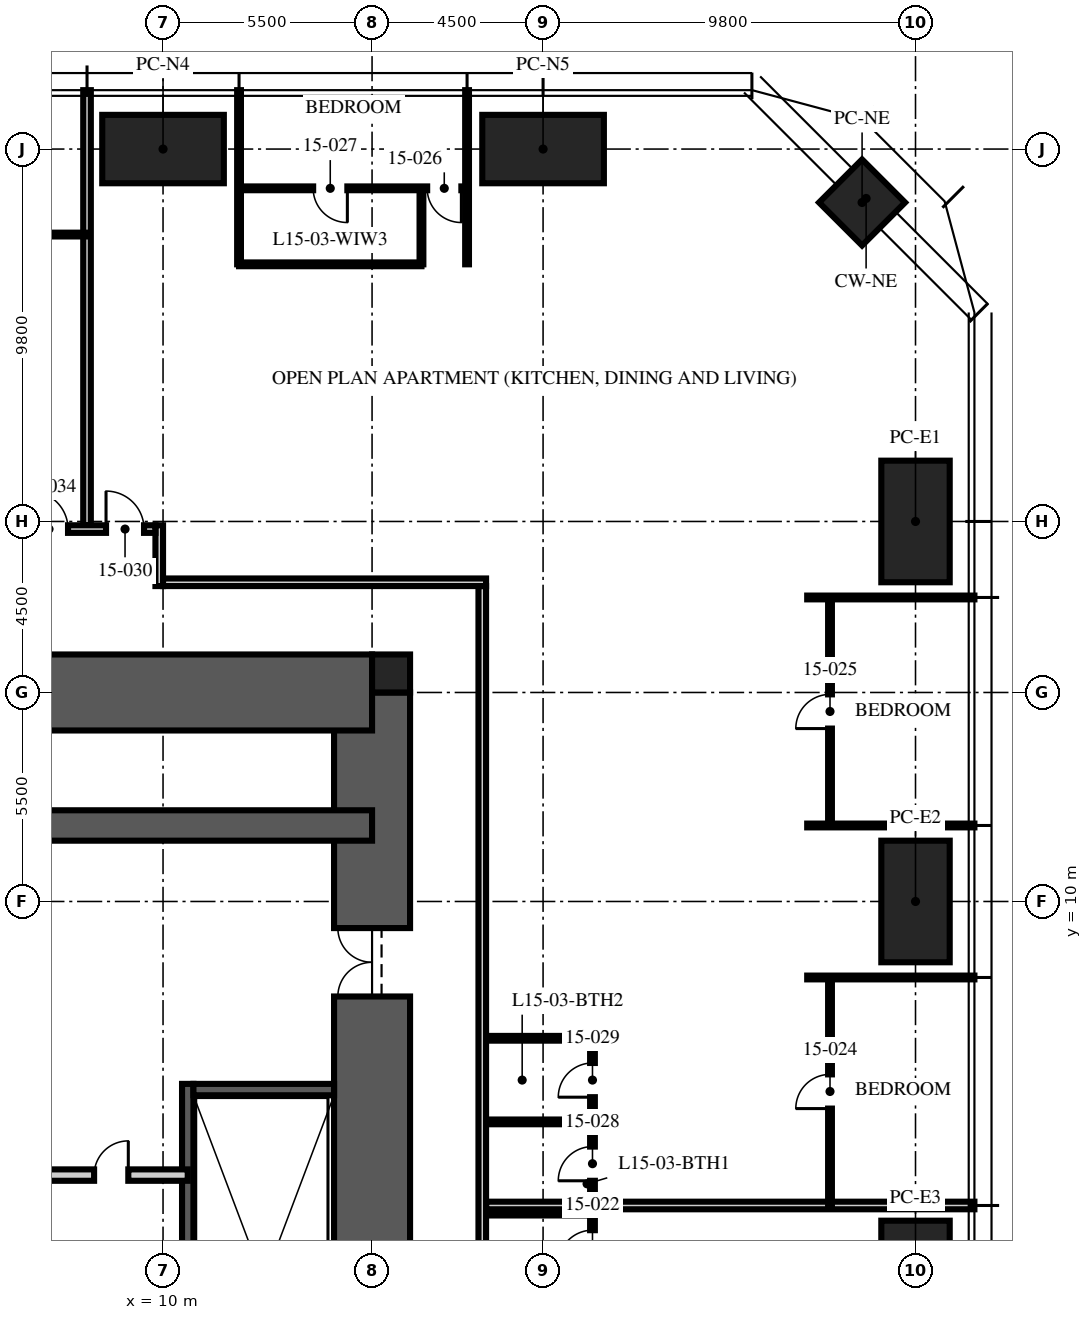
"""IFC4 building model, lengths in metres.
Left out: names, types, materials, properties, quantities, classifications, styles, units other than length and angle.
Written with IfcOpenShell. Run it as: python <this file> out.ifc"""

import sys

from ifc_helpers import new_model, si_unit, direction, frame, frame_2d, origin, origin_2d, place, context, subcontext, project, spatial, rectangle, hollow_rectangle, extrude, element, fill, save


model = new_model("IFC4")
c1 = context("Model", 3, precision=1e-05, world=origin(), true_north=direction((0.0, 1.0)))
c2 = subcontext(c1, "Body", "Model", "MODEL_VIEW")
j1 = project(units=[si_unit("LENGTHUNIT", "METRE"), si_unit("PLANEANGLEUNIT", "RADIAN")], contexts=[c1])
p1 = place(None, origin())
s1 = spatial("IfcSite", under=j1, at=p1, CompositionType="ELEMENT")
p2 = place(p1, origin())
s2 = spatial("IfcBuilding", under=s1, at=p2, CompositionType="ELEMENT")
p3 = place(p2, frame((0.0, 0.0, 62.25)))
s3 = spatial("IfcBuildingStorey", under=s2, at=p3, CompositionType="ELEMENT", Elevation=62.25)
p4 = place(p3, frame((15.5, -15.5, -0.25), z_axis=(0.0, 0.0, 1.0), x_axis=(0.0, 1.0, 0.0)))
e1 = element("IfcWall", 1, at=p4, inside=s3, PredefinedType="SHEAR", context=c2, shape_type="SweptSolid", body=[
    extrude(rectangle(XDim=31.0, YDim=2.0, at=frame_2d((15.5, 0.0))), origin(), (0.0, 0.0, 1.0), 3.75),
])
p5 = place(p4, frame((6.5, 0.0, 0.25)))
e2 = element("IfcOpeningElement", 2, at=p5, cuts=e1, PredefinedType="OPENING", context=c2, shape_type="SweptSolid", body=[
    extrude(rectangle(XDim=1.2, YDim=2.1, at=frame_2d((0.6, 1.05))), frame((0.0, 1.01, 0.0), z_axis=(0.0, -1.0, 0.0), x_axis=(1.0, 0.0, 0.0)), (0.0, 0.0, 1.0), 2.02),
])
p6 = place(p4, frame((23.0, 0.0, 0.25)))
e3 = element("IfcOpeningElement", 3, at=p6, cuts=e1, PredefinedType="OPENING", context=c2, shape_type="SweptSolid", body=[
    extrude(rectangle(XDim=1.8, YDim=2.1, at=frame_2d((0.9, 1.05))), frame((0.0, 1.01, 0.0), z_axis=(0.0, -1.0, 0.0), x_axis=(1.0, 0.0, 0.0)), (0.0, 0.0, 1.0), 2.02),
])
p7 = place(p3, frame((-15.5, 15.5, -0.25), z_axis=(0.0, 0.0, 1.0), x_axis=(1.0, 0.0, 0.0)))
e4 = element("IfcWall", 4, at=p7, inside=s3, PredefinedType="SHEAR", context=c2, shape_type="SweptSolid", body=[
    extrude(rectangle(XDim=31.0, YDim=2.0, at=frame_2d((15.5, 0.0))), origin(), (0.0, 0.0, 1.0), 3.75),
])
p8 = place(p7, frame((10.4, 0.0, 0.25)))
e5 = element("IfcOpeningElement", 5, at=p8, cuts=e4, PredefinedType="OPENING", context=c2, shape_type="SweptSolid", body=[
    extrude(rectangle(XDim=1.1, YDim=2.1, at=frame_2d((0.55, 1.05))), frame((0.0, 1.01, 0.0), z_axis=(0.0, -1.0, 0.0), x_axis=(1.0, 0.0, 0.0)), (0.0, 0.0, 1.0), 2.02),
])
p9 = place(p7, frame((13.5, 0.0, 0.25)))
e6 = element("IfcOpeningElement", 6, at=p9, cuts=e4, PredefinedType="OPENING", context=c2, shape_type="SweptSolid", body=[
    extrude(rectangle(XDim=1.1, YDim=2.1, at=frame_2d((0.55, 1.05))), frame((0.0, 1.01, 0.0), z_axis=(0.0, -1.0, 0.0), x_axis=(1.0, 0.0, 0.0)), (0.0, 0.0, 1.0), 2.02),
])
p10 = place(p7, frame((16.6, 0.0, 0.25)))
e7 = element("IfcOpeningElement", 7, at=p10, cuts=e4, PredefinedType="OPENING", context=c2, shape_type="SweptSolid", body=[
    extrude(rectangle(XDim=1.1, YDim=2.1, at=frame_2d((0.55, 1.05))), frame((0.0, 1.01, 0.0), z_axis=(0.0, -1.0, 0.0), x_axis=(1.0, 0.0, 0.0)), (0.0, 0.0, 1.0), 2.02),
])
p11 = place(p3, frame((-15.5, 12.0, -0.25), z_axis=(0.0, 0.0, 1.0), x_axis=(1.0, 0.0, 0.0)))
e8 = element("IfcWall", 8, at=p11, inside=s3, PredefinedType="SHEAR", context=c2, shape_type="SweptSolid", body=[
    extrude(rectangle(XDim=31.0, YDim=0.8, at=frame_2d((15.5, 0.0))), origin(), (0.0, 0.0, 1.0), 3.75),
])
p12 = place(p3, frame((16.0, 16.0, -0.25), z_axis=(0.0, 0.0, 1.0), x_axis=(1.0, 0.0, 0.0)))
e9 = element("IfcColumn", 9, at=p12, inside=s3, PredefinedType="COLUMN", context=c2, shape_type="SweptSolid", body=[
    extrude(rectangle(XDim=1.0, YDim=1.0, at=origin_2d()), origin(), (0.0, 0.0, 1.0), 3.75),
])
for number, where, z_axis, x_axis in (
    (10, (10.0, 29.8, 0.0), (0.0, 0.0, 1.0), (1.0, 0.0, 0.0)),
    (11, (20.0, 29.8, 0.0), (0.0, 0.0, 1.0), (1.0, 0.0, 0.0)),
    (12, (29.8, 20.0, 0.0), (0.0, 0.0, 1.0), (0.0, 1.0, 0.0)),
    (13, (29.8, 10.0, 0.0), (0.0, 0.0, 1.0), (0.0, 1.0, 0.0)),
    (14, (29.8, 0.0, 0.0), (0.0, 0.0, 1.0), (0.0, 1.0, 0.0)),
):
    element("IfcColumn", number, at=place(p3, frame(where, z_axis=z_axis, x_axis=x_axis)), inside=s3, PredefinedType="COLUMN", context=c2, shape_type="SweptSolid", body=[
        extrude(hollow_rectangle(XDim=3.2, YDim=1.8, WallThickness=0.2, at=origin_2d()), origin(), (0.0, 0.0, 1.0), 3.75),
    ])
p13 = place(p3, frame((28.394, 28.394, 0.0), z_axis=(0.0, 0.0, 1.0), x_axis=(0.707106781187, -0.707106781187, 0.0)))
e15 = element("IfcColumn", 15, at=p13, inside=s3, PredefinedType="COLUMN", context=c2, shape_type="SweptSolid", body=[
    extrude(hollow_rectangle(XDim=1.6, YDim=1.6, WallThickness=0.1, at=origin_2d()), origin(), (0.0, 0.0, 1.0), 3.75),
])
p14 = place(p3, frame((10.65, -4.9, 0.0), z_axis=(0.0, 0.0, 1.0), x_axis=(0.0, 1.0, 0.0)))
e16 = element("IfcWall", 16, at=p14, inside=s3, PredefinedType="SOLIDWALL", context=c2, shape_type="SweptSolid", body=[
    extrude(rectangle(XDim=10.1, YDim=0.3, at=frame_2d((5.05, 0.0))), origin(), (0.0, 0.0, 1.0), 3.5),
])
p15 = place(p3, frame((14.5, 5.05, 0.0), z_axis=(0.0, 0.0, 1.0), x_axis=(-1.0, 0.0, 0.0)))
e17 = element("IfcWall", 17, at=p15, inside=s3, PredefinedType="SOLIDWALL", context=c2, shape_type="SweptSolid", body=[
    extrude(rectangle(XDim=3.7, YDim=0.3, at=frame_2d((1.85, 0.0))), origin(), (0.0, 0.0, 1.0), 3.5),
])
p16 = place(p3, frame((-10.65, 2.8, 0.0), z_axis=(0.0, 0.0, 1.0), x_axis=(1.0, 0.0, 0.0)))
e18 = element("IfcWall", 18, at=p16, inside=s3, PredefinedType="PARTITIONING", context=c2, shape_type="SweptSolid", body=[
    extrude(rectangle(XDim=21.3, YDim=0.3, at=frame_2d((10.65, 0.0))), origin(), (0.0, 0.0, 1.0), 3.5),
])
p17 = place(p16, frame((10.05, 0.0, 0.0)))
e19 = element("IfcOpeningElement", 19, at=p17, cuts=e18, PredefinedType="OPENING", context=c2, shape_type="SweptSolid", body=[
    extrude(rectangle(XDim=1.2, YDim=2.1, at=frame_2d((0.6, 1.05))), frame((0.0, 0.16, 0.0), z_axis=(0.0, -1.0, 0.0), x_axis=(1.0, 0.0, 0.0)), (0.0, 0.0, 1.0), 0.32),
])
p18 = place(p16, frame((1.493, 0.0, 0.0)))
e20 = element("IfcOpeningElement", 20, at=p18, cuts=e18, PredefinedType="OPENING", context=c2, shape_type="SweptSolid", body=[
    extrude(rectangle(XDim=0.9, YDim=2.1, at=frame_2d((0.45, 1.05))), frame((0.0, 0.16, 0.0), z_axis=(0.0, -1.0, 0.0), x_axis=(1.0, 0.0, 0.0)), (0.0, 0.0, 1.0), 0.32),
])
p19 = place(p16, frame((18.836, 0.0, 0.0)))
e21 = element("IfcOpeningElement", 21, at=p19, cuts=e18, PredefinedType="OPENING", context=c2, shape_type="SweptSolid", body=[
    extrude(rectangle(XDim=0.9, YDim=2.1, at=frame_2d((0.45, 1.05))), frame((0.0, 0.16, 0.0), z_axis=(0.0, -1.0, 0.0), x_axis=(1.0, 0.0, 0.0)), (0.0, 0.0, 1.0), 0.32),
])
p20 = place(p3, frame((18.5, 2.0, 0.0), z_axis=(0.0, 0.0, 1.0), x_axis=(1.0, 0.0, 0.0)))
e22 = element("IfcWall", 22, at=p20, inside=s3, PredefinedType="PARTITIONING", context=c2, shape_type="SweptSolid", body=[
    extrude(rectangle(XDim=12.85, YDim=0.2, at=frame_2d((6.425, 0.0))), origin(), (0.0, 0.0, 1.0), 2.71),
])
for number, where, z_axis, x_axis in (
    (23, (26.95, 8.0, 0.0), (0.0, 0.0, 1.0), (1.0, 0.0, 0.0)),
    (24, (26.95, 12.0, 0.0), (0.0, 0.0, 1.0), (1.0, 0.0, 0.0)),
    (25, (26.95, 18.0, 0.0), (0.0, 0.0, 1.0), (1.0, 0.0, 0.0)),
):
    element("IfcWall", number, at=place(p3, frame(where, z_axis=z_axis, x_axis=x_axis)), inside=s3, PredefinedType="PARTITIONING", context=c2, shape_type="SweptSolid", body=[
        extrude(rectangle(XDim=4.4, YDim=0.1, at=frame_2d((2.2, 0.0))), origin(), (0.0, 0.0, 1.0), 2.71),
    ])
for number, where, z_axis, x_axis in (
    (26, (18.0, 26.767, 0.0), (0.0, 0.0, 1.0), (0.0, 1.0, 0.0)),
    (27, (12.0, 26.767, 0.0), (0.0, 0.0, 1.0), (0.0, 1.0, 0.0)),
):
    element("IfcWall", number, at=place(p3, frame(where, z_axis=z_axis, x_axis=x_axis)), inside=s3, PredefinedType="PARTITIONING", context=c2, shape_type="SweptSolid", body=[
        extrude(rectangle(XDim=4.583, YDim=0.1, at=frame_2d((2.292, 0.0))), origin(), (0.0, 0.0, 1.0), 2.71),
    ])
p21 = place(p3, frame((8.0, 19.9, 0.0), z_axis=(0.0, 0.0, 1.0), x_axis=(0.0, 1.0, 0.0)))
e28 = element("IfcWall", 28, at=p21, inside=s3, PredefinedType="PARTITIONING", context=c2, shape_type="SweptSolid", body=[
    extrude(rectangle(XDim=11.45, YDim=0.2, at=frame_2d((5.725, 0.0))), origin(), (0.0, 0.0, 1.0), 2.71),
])
p22 = place(p3, frame((21.3, 0.0, 0.0), z_axis=(0.0, 0.0, 1.0), x_axis=(0.0, 1.0, 0.0)))
e29 = element("IfcWall", 29, at=p22, inside=s3, PredefinedType="PARTITIONING", context=c2, shape_type="SweptSolid", body=[
    extrude(rectangle(XDim=1.8, YDim=0.125, at=frame_2d((0.9, 0.0))), origin(), (0.0, 0.0, 1.0), 2.492),
])
p23 = place(p22, frame((0.45, 0.0, 0.0)))
e30 = element("IfcOpeningElement", 30, at=p23, cuts=e29, PredefinedType="OPENING", context=c2, shape_type="SweptSolid", body=[
    extrude(rectangle(XDim=0.9, YDim=2.1, at=frame_2d((0.45, 1.05))), frame((0.0, 0.073, 0.0), z_axis=(0.0, -1.0, 0.0), x_axis=(1.0, 0.0, 0.0)), (0.0, 0.0, 1.0), 0.145),
])
p24 = place(p3, frame((18.5, 1.8, 0.0), z_axis=(0.0, 0.0, 1.0), x_axis=(1.0, 0.0, 0.0)))
e31 = element("IfcWall", 31, at=p24, inside=s3, PredefinedType="PARTITIONING", context=c2, shape_type="SweptSolid", body=[
    extrude(rectangle(XDim=2.8, YDim=0.125, at=frame_2d((1.4, 0.0))), origin(), (0.0, 0.0, 1.0), 3.5),
])
p25 = place(p3, frame((27.55, 2.0, 0.0), z_axis=(0.0, 0.0, 1.0), x_axis=(0.0, 1.0, 0.0)))
e32 = element("IfcWall", 32, at=p25, inside=s3, PredefinedType="PARTITIONING", context=c2, shape_type="SweptSolid", body=[
    extrude(rectangle(XDim=6.0, YDim=0.1, at=frame_2d((3.0, 0.0))), origin(), (0.0, 0.0, 1.0), 2.61),
])
p26 = place(p25, frame((2.55, 0.0, 0.0)))
e33 = element("IfcOpeningElement", 33, at=p26, cuts=e32, PredefinedType="OPENING", context=c2, shape_type="SweptSolid", body=[
    extrude(rectangle(XDim=0.9, YDim=2.1, at=frame_2d((0.45, 1.05))), frame((0.0, 0.06, 0.0), z_axis=(0.0, -1.0, 0.0), x_axis=(1.0, 0.0, 0.0)), (0.0, 0.0, 1.0), 0.12),
])
p27 = place(p3, frame((27.55, 12.0, 0.0), z_axis=(0.0, 0.0, 1.0), x_axis=(0.0, 1.0, 0.0)))
e34 = element("IfcWall", 34, at=p27, inside=s3, PredefinedType="PARTITIONING", context=c2, shape_type="SweptSolid", body=[
    extrude(rectangle(XDim=6.0, YDim=0.1, at=frame_2d((3.0, 0.0))), origin(), (0.0, 0.0, 1.0), 2.61),
])
p28 = place(p27, frame((2.55, 0.0, 0.0)))
e35 = element("IfcOpeningElement", 35, at=p28, cuts=e34, PredefinedType="OPENING", context=c2, shape_type="SweptSolid", body=[
    extrude(rectangle(XDim=0.9, YDim=2.1, at=frame_2d((0.45, 1.05))), frame((0.0, 0.06, 0.0), z_axis=(0.0, -1.0, 0.0), x_axis=(1.0, 0.0, 0.0)), (0.0, 0.0, 1.0), 0.12),
])
p29 = place(p3, frame((18.0, 28.767, 0.0), z_axis=(0.0, 0.0, 1.0), x_axis=(-1.0, 0.0, 0.0)))
e36 = element("IfcWall", 36, at=p29, inside=s3, PredefinedType="PARTITIONING", context=c2, shape_type="SweptSolid", body=[
    extrude(rectangle(XDim=6.0, YDim=0.1, at=frame_2d((3.0, 0.0))), origin(), (0.0, 0.0, 1.0), 2.61),
])
p30 = place(p29, frame((0.15, 0.0, 0.0)))
e37 = element("IfcOpeningElement", 37, at=p30, cuts=e36, PredefinedType="OPENING", context=c2, shape_type="SweptSolid", body=[
    extrude(rectangle(XDim=0.9, YDim=2.1, at=frame_2d((0.45, 1.05))), frame((0.0, 0.06, 0.0), z_axis=(0.0, -1.0, 0.0), x_axis=(1.0, 0.0, 0.0)), (0.0, 0.0, 1.0), 0.12),
])
p31 = place(p29, frame((3.15, 0.0, 0.0)))
e38 = element("IfcOpeningElement", 38, at=p31, cuts=e36, PredefinedType="OPENING", context=c2, shape_type="SweptSolid", body=[
    extrude(rectangle(XDim=0.9, YDim=2.1, at=frame_2d((0.45, 1.05))), frame((0.0, 0.06, 0.0), z_axis=(0.0, -1.0, 0.0), x_axis=(1.0, 0.0, 0.0)), (0.0, 0.0, 1.0), 0.12),
])
p32 = place(p3, frame((16.8, 26.767, 0.0), z_axis=(0.0, 0.0, 1.0), x_axis=(0.0, 1.0, 0.0)))
e39 = element("IfcWall", 39, at=p32, inside=s3, PredefinedType="PARTITIONING", context=c2, shape_type="SweptSolid", body=[
    extrude(rectangle(XDim=2.0, YDim=0.1, at=frame_2d((1.0, 0.0))), origin(), (0.0, 0.0, 1.0), 3.5),
])
p33 = place(p3, frame((16.8, 26.767, 0.0), z_axis=(0.0, 0.0, 1.0), x_axis=(-1.0, 0.0, 0.0)))
e40 = element("IfcWall", 40, at=p33, inside=s3, PredefinedType="PARTITIONING", context=c2, shape_type="SweptSolid", body=[
    extrude(rectangle(XDim=4.8, YDim=0.1, at=frame_2d((2.4, 0.0))), origin(), (0.0, 0.0, 1.0), 2.61),
])
p34 = place(p3, frame((21.3, 2.0, 0.0), z_axis=(0.0, 0.0, 1.0), x_axis=(0.0, 1.0, 0.0)))
e41 = element("IfcWall", 41, at=p34, inside=s3, PredefinedType="PARTITIONING", context=c2, shape_type="SweptSolid", body=[
    extrude(rectangle(XDim=4.4, YDim=0.125, at=frame_2d((2.2, 0.0))), origin(), (0.0, 0.0, 1.0), 2.61),
])
p35 = place(p34, frame((0.65, 0.0, 0.0)))
e42 = element("IfcOpeningElement", 42, at=p35, cuts=e41, PredefinedType="OPENING", context=c2, shape_type="SweptSolid", body=[
    extrude(rectangle(XDim=0.9, YDim=2.1, at=frame_2d((0.45, 1.05))), frame((0.0, 0.073, 0.0), z_axis=(0.0, -1.0, 0.0), x_axis=(1.0, 0.0, 0.0)), (0.0, 0.0, 1.0), 0.145),
])
p36 = place(p34, frame((2.85, 0.0, 0.0)))
e43 = element("IfcOpeningElement", 43, at=p36, cuts=e41, PredefinedType="OPENING", context=c2, shape_type="SweptSolid", body=[
    extrude(rectangle(XDim=0.9, YDim=2.1, at=frame_2d((0.45, 1.05))), frame((0.0, 0.073, 0.0), z_axis=(0.0, -1.0, 0.0), x_axis=(1.0, 0.0, 0.0)), (0.0, 0.0, 1.0), 0.145),
])
for number, where, z_axis, x_axis in (
    (44, (18.5, 4.2, 0.0), (0.0, 0.0, 1.0), (1.0, 0.0, 0.0)),
    (45, (18.5, 6.4, 0.0), (0.0, 0.0, 1.0), (1.0, 0.0, 0.0)),
):
    element("IfcWall", number, at=place(p3, frame(where, z_axis=z_axis, x_axis=x_axis)), inside=s3, PredefinedType="PARTITIONING", context=c2, shape_type="SweptSolid", body=[
        extrude(rectangle(XDim=2.8, YDim=0.125, at=frame_2d((1.4, 0.0))), origin(), (0.0, 0.0, 1.0), 3.5),
    ])
p37 = place(p3, frame((8.0, 27.55, 0.0), z_axis=(0.0, 0.0, 1.0), x_axis=(-1.0, 0.0, 0.0)))
e46 = element("IfcWall", 46, at=p37, inside=s3, PredefinedType="PARTITIONING", context=c2, shape_type="SweptSolid", body=[
    extrude(rectangle(XDim=6.0, YDim=0.1, at=frame_2d((3.0, 0.0))), origin(), (0.0, 0.0, 1.0), 2.61),
])
p38 = place(p37, frame((2.55, 0.0, 0.0)))
e47 = element("IfcOpeningElement", 47, at=p38, cuts=e46, PredefinedType="OPENING", context=c2, shape_type="SweptSolid", body=[
    extrude(rectangle(XDim=0.9, YDim=2.1, at=frame_2d((0.45, 1.05))), frame((0.0, 0.06, 0.0), z_axis=(0.0, -1.0, 0.0), x_axis=(1.0, 0.0, 0.0)), (0.0, 0.0, 1.0), 0.12),
])
p39 = place(p3, frame((18.4, 0.0, 0.0), z_axis=(0.0, 0.0, 1.0), x_axis=(0.0, 1.0, 0.0)))
e48 = element("IfcWall", 48, at=p39, inside=s3, PredefinedType="PARTITIONING", context=c2, shape_type="SweptSolid", body=[
    extrude(rectangle(XDim=18.3, YDim=0.2, at=frame_2d((9.15, 0.0))), origin(), (0.0, 0.0, 1.0), 2.3),
])
p40 = place(p3, frame((9.9, 18.3, 0.0), z_axis=(0.0, 0.0, 1.0), x_axis=(0.0, 1.0, 0.0)))
e49 = element("IfcWall", 49, at=p40, inside=s3, PredefinedType="PARTITIONING", context=c2, shape_type="SweptSolid", body=[
    extrude(rectangle(XDim=1.6, YDim=0.2, at=frame_2d((0.8, 0.0))), origin(), (0.0, 0.0, 1.0), 2.492),
])
p41 = place(p3, frame((6.2, 19.8, 0.0), z_axis=(0.0, 0.0, 1.0), x_axis=(1.0, 0.0, 0.0)))
e50 = element("IfcWall", 50, at=p41, inside=s3, PredefinedType="PARTITIONING", context=c2, shape_type="SweptSolid", body=[
    extrude(rectangle(XDim=3.6, YDim=0.2, at=frame_2d((1.8, 0.0))), origin(), (0.0, 0.0, 1.0), 3.5),
])
p42 = place(p41, frame((2.3, 0.0, 0.0)))
e51 = element("IfcOpeningElement", 51, at=p42, cuts=e50, PredefinedType="OPENING", context=c2, shape_type="SweptSolid", body=[
    extrude(rectangle(XDim=1.0, YDim=2.2, at=frame_2d((0.5, 1.1))), frame((0.0, 0.11, 0.0), z_axis=(0.0, -1.0, 0.0), x_axis=(1.0, 0.0, 0.0)), (0.0, 0.0, 1.0), 0.22),
])
p43 = place(p41, frame((0.3, 0.0, 0.0)))
e52 = element("IfcOpeningElement", 52, at=p43, cuts=e50, PredefinedType="OPENING", context=c2, shape_type="SweptSolid", body=[
    extrude(rectangle(XDim=1.0, YDim=2.2, at=frame_2d((0.5, 1.1))), frame((0.0, 0.11, 0.0), z_axis=(0.0, -1.0, 0.0), x_axis=(1.0, 0.0, 0.0)), (0.0, 0.0, 1.0), 0.22),
])
p44 = place(p3, frame((10.0, 18.4, 0.0), z_axis=(0.0, 0.0, 1.0), x_axis=(1.0, 0.0, 0.0)))
e53 = element("IfcWall", 53, at=p44, inside=s3, PredefinedType="PARTITIONING", context=c2, shape_type="SweptSolid", body=[
    extrude(rectangle(XDim=8.5, YDim=0.2, at=frame_2d((4.25, 0.0))), origin(), (0.0, 0.0, 1.0), 2.3),
])
p45 = place(p6, origin())
e54 = element("IfcDoor", 54, at=p45, inside=s3, OperationType="DOUBLE_DOOR_SINGLE_SWING", PredefinedType="DOOR", context=c2, shape_type="SweptSolid", body=[
    extrude(rectangle(XDim=1.8, YDim=2.1, at=frame_2d((0.9, 1.05))), frame((0.0, 0.025, 0.0), z_axis=(0.0, -1.0, 0.0), x_axis=(1.0, 0.0, 0.0)), (0.0, 0.0, 1.0), 0.05),
])
fill(e3, e54)
p46 = place(p19, origin())
e55 = element("IfcDoor", 55, at=p46, inside=s3, OperationType="SINGLE_SWING_RIGHT", PredefinedType="DOOR", context=c2, shape_type="SweptSolid", body=[
    extrude(rectangle(XDim=0.9, YDim=2.1, at=frame_2d((0.45, 1.05))), frame((0.0, 0.025, 0.0), z_axis=(0.0, -1.0, 0.0), x_axis=(1.0, 0.0, 0.0)), (0.0, 0.0, 1.0), 0.05),
])
fill(e21, e55)
p47 = place(p23, origin())
e56 = element("IfcDoor", 56, at=p47, inside=s3, OperationType="SINGLE_SWING_LEFT", PredefinedType="DOOR", context=c2, shape_type="SweptSolid", body=[
    extrude(rectangle(XDim=0.9, YDim=2.1, at=frame_2d((0.45, 1.05))), frame((0.0, 0.025, 0.0), z_axis=(0.0, -1.0, 0.0), x_axis=(1.0, 0.0, 0.0)), (0.0, 0.0, 1.0), 0.05),
])
fill(e30, e56)
p48 = place(p26, origin())
e57 = element("IfcDoor", 57, at=p48, inside=s3, OperationType="SINGLE_SWING_LEFT", PredefinedType="DOOR", context=c2, shape_type="SweptSolid", body=[
    extrude(rectangle(XDim=0.9, YDim=2.1, at=frame_2d((0.45, 1.05))), frame((0.0, 0.025, 0.0), z_axis=(0.0, -1.0, 0.0), x_axis=(1.0, 0.0, 0.0)), (0.0, 0.0, 1.0), 0.05),
])
fill(e33, e57)
p49 = place(p28, origin())
e58 = element("IfcDoor", 58, at=p49, inside=s3, OperationType="SINGLE_SWING_LEFT", PredefinedType="DOOR", context=c2, shape_type="SweptSolid", body=[
    extrude(rectangle(XDim=0.9, YDim=2.1, at=frame_2d((0.45, 1.05))), frame((0.0, 0.025, 0.0), z_axis=(0.0, -1.0, 0.0), x_axis=(1.0, 0.0, 0.0)), (0.0, 0.0, 1.0), 0.05),
])
fill(e35, e58)
p50 = place(p30, origin())
e59 = element("IfcDoor", 59, at=p50, inside=s3, OperationType="SINGLE_SWING_LEFT", PredefinedType="DOOR", context=c2, shape_type="SweptSolid", body=[
    extrude(rectangle(XDim=0.9, YDim=2.1, at=frame_2d((0.45, 1.05))), frame((0.0, 0.025, 0.0), z_axis=(0.0, -1.0, 0.0), x_axis=(1.0, 0.0, 0.0)), (0.0, 0.0, 1.0), 0.05),
])
fill(e37, e59)
p51 = place(p31, origin())
e60 = element("IfcDoor", 60, at=p51, inside=s3, OperationType="SINGLE_SWING_LEFT", PredefinedType="DOOR", context=c2, shape_type="SweptSolid", body=[
    extrude(rectangle(XDim=0.9, YDim=2.1, at=frame_2d((0.45, 1.05))), frame((0.0, 0.025, 0.0), z_axis=(0.0, -1.0, 0.0), x_axis=(1.0, 0.0, 0.0)), (0.0, 0.0, 1.0), 0.05),
])
fill(e38, e60)
p52 = place(p35, origin())
e61 = element("IfcDoor", 61, at=p52, inside=s3, OperationType="SINGLE_SWING_LEFT", PredefinedType="DOOR", context=c2, shape_type="SweptSolid", body=[
    extrude(rectangle(XDim=0.9, YDim=2.1, at=frame_2d((0.45, 1.05))), frame((0.0, 0.025, 0.0), z_axis=(0.0, -1.0, 0.0), x_axis=(1.0, 0.0, 0.0)), (0.0, 0.0, 1.0), 0.05),
])
fill(e42, e61)
p53 = place(p36, origin())
e62 = element("IfcDoor", 62, at=p53, inside=s3, OperationType="SINGLE_SWING_LEFT", PredefinedType="DOOR", context=c2, shape_type="SweptSolid", body=[
    extrude(rectangle(XDim=0.9, YDim=2.1, at=frame_2d((0.45, 1.05))), frame((0.0, 0.025, 0.0), z_axis=(0.0, -1.0, 0.0), x_axis=(1.0, 0.0, 0.0)), (0.0, 0.0, 1.0), 0.05),
])
fill(e43, e62)
p54 = place(p42, origin())
e63 = element("IfcDoor", 63, at=p54, inside=s3, OperationType="SINGLE_SWING_LEFT", PredefinedType="DOOR", context=c2, shape_type="SweptSolid", body=[
    extrude(rectangle(XDim=1.0, YDim=2.2, at=frame_2d((0.5, 1.1))), frame((0.0, 0.025, 0.0), z_axis=(0.0, -1.0, 0.0), x_axis=(1.0, 0.0, 0.0)), (0.0, 0.0, 1.0), 0.05),
])
fill(e51, e63)
p55 = place(p43, origin())
e64 = element("IfcDoor", 64, at=p55, inside=s3, OperationType="SINGLE_SWING_LEFT", PredefinedType="DOOR", context=c2, shape_type="SweptSolid", body=[
    extrude(rectangle(XDim=1.0, YDim=2.2, at=frame_2d((0.5, 1.1))), frame((0.0, 0.025, 0.0), z_axis=(0.0, -1.0, 0.0), x_axis=(1.0, 0.0, 0.0)), (0.0, 0.0, 1.0), 0.05),
])
fill(e52, e64)
save(model, sys.argv[1])
